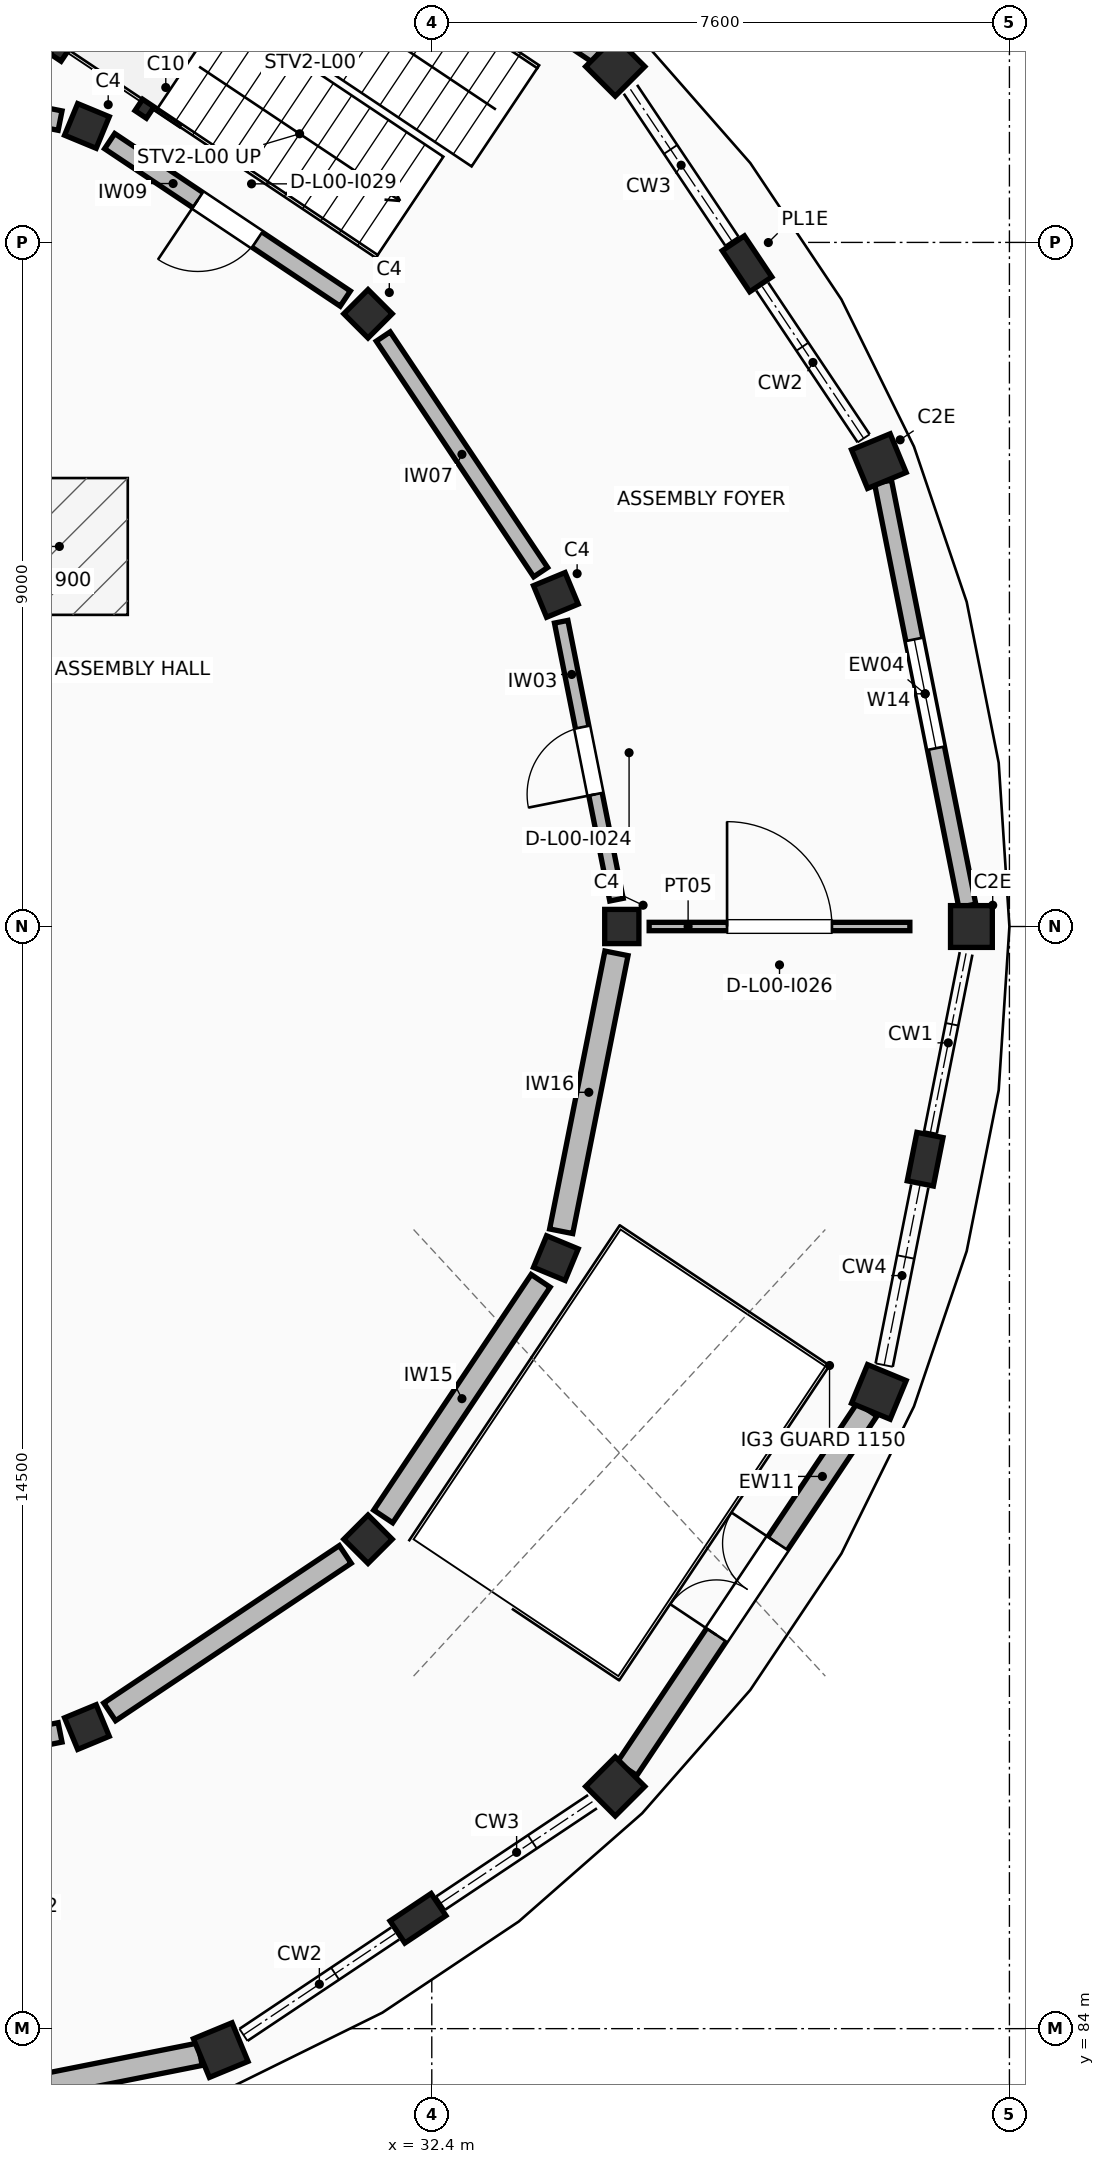
"""IFC4 building model, lengths in metres.
Left out: names, types, materials, properties, quantities, classifications, styles, units other than length and angle.
Written with IfcOpenShell. Run it as: python <this file> out.ifc"""

import sys

from ifc_helpers import new_model, si_unit, direction, frame, frame_2d, origin, origin_2d, place, context, subcontext, project, spatial, rectangle, hollow_rectangle, extrude, element, fill, save


model = new_model("IFC4")
c1 = context("Model", 3, precision=1e-05, world=origin(), true_north=direction((0.0, 1.0)))
c2 = subcontext(c1, "Body", "Model", "MODEL_VIEW")
j1 = project(units=[si_unit("LENGTHUNIT", "METRE"), si_unit("PLANEANGLEUNIT", "RADIAN")], contexts=[c1])
p1 = place(None, origin())
s1 = spatial("IfcSite", under=j1, at=p1, CompositionType="ELEMENT")
p2 = place(p1, origin())
s2 = spatial("IfcBuilding", under=s1, at=p2, CompositionType="ELEMENT")
p3 = place(p2, origin())
s3 = spatial("IfcBuildingStorey", under=s2, at=p3, CompositionType="ELEMENT", Elevation=0.0)
p4 = place(p3, frame((34.9, 98.5, 0.0), z_axis=(0.0, 0.0, 1.0), x_axis=(1.0, 0.0, 0.0)))
e1 = element("IfcColumn", 1, at=p4, inside=s3, PredefinedType="COLUMN", context=c2, shape_type="SweptSolid", body=[
    extrude(rectangle(XDim=0.45, YDim=0.45, at=origin_2d()), origin(), (0.0, 0.0, 1.0), 4.42),
])
p5 = place(p3, frame((39.5, 98.5, 0.0), z_axis=(0.0, 0.0, 1.0), x_axis=(1.0, 0.0, 0.0)))
e2 = element("IfcColumn", 2, at=p5, inside=s3, PredefinedType="COLUMN", context=c2, shape_type="SweptSolid", body=[
    extrude(rectangle(XDim=0.55, YDim=0.55, at=origin_2d()), origin(), (0.0, 0.0, 1.0), 4.42),
])
p6 = place(p3, frame((34.032, 102.863, 0.0), z_axis=(0.0, 0.0, 1.0), x_axis=(0.923879532511, 0.382683432365, 0.0)))
e3 = element("IfcColumn", 3, at=p6, inside=s3, PredefinedType="COLUMN", context=c2, shape_type="SweptSolid", body=[
    extrude(rectangle(XDim=0.45, YDim=0.45, at=origin_2d()), origin(), (0.0, 0.0, 1.0), 4.42),
])
p7 = place(p3, frame((38.282, 104.623, 0.0), z_axis=(0.0, 0.0, 1.0), x_axis=(0.923879532511, 0.382683432365, 0.0)))
e4 = element("IfcColumn", 4, at=p7, inside=s3, PredefinedType="COLUMN", context=c2, shape_type="SweptSolid", body=[
    extrude(rectangle(XDim=0.55, YDim=0.55, at=origin_2d()), origin(), (0.0, 0.0, 1.0), 4.42),
])
p8 = place(p3, frame((31.561, 106.561, 0.0), z_axis=(0.0, 0.0, 1.0), x_axis=(0.707106781187, 0.707106781187, 0.0)))
e5 = element("IfcColumn", 5, at=p8, inside=s3, PredefinedType="COLUMN", context=c2, shape_type="SweptSolid", body=[
    extrude(rectangle(XDim=0.45, YDim=0.45, at=origin_2d()), origin(), (0.0, 0.0, 1.0), 4.42),
])
p9 = place(p3, frame((34.814, 109.814, 0.0), z_axis=(0.0, 0.0, 1.0), x_axis=(0.707106781187, 0.707106781187, 0.0)))
e6 = element("IfcColumn", 6, at=p9, inside=s3, PredefinedType="COLUMN", context=c2, shape_type="SweptSolid", body=[
    extrude(rectangle(XDim=0.55, YDim=0.55, at=origin_2d()), origin(), (0.0, 0.0, 1.0), 4.42),
])
for number, where, z_axis, x_axis in (
    (7, (27.863, 109.032, 0.0), (0.0, 0.0, 1.0), (0.383, 0.924, 0.0)),
    (8, (27.863, 87.968, 0.0), (0.0, 0.0, 1.0), (0.383, -0.924, 0.0)),
):
    element("IfcColumn", number, at=place(p3, frame(where, z_axis=z_axis, x_axis=x_axis)), inside=s3, PredefinedType="COLUMN", context=c2, shape_type="SweptSolid", body=[
        extrude(rectangle(XDim=0.45, YDim=0.45, at=origin_2d()), origin(), (0.0, 0.0, 1.0), 4.42),
    ])
p10 = place(p3, frame((29.623, 83.718, 0.0), z_axis=(0.0, 0.0, 1.0), x_axis=(0.382683432365, -0.923879532511, 0.0)))
e9 = element("IfcColumn", 9, at=p10, inside=s3, PredefinedType="COLUMN", context=c2, shape_type="SweptSolid", body=[
    extrude(rectangle(XDim=0.55, YDim=0.55, at=origin_2d()), origin(), (0.0, 0.0, 1.0), 4.42),
])
p11 = place(p3, frame((31.561, 90.439, 0.0), z_axis=(0.0, 0.0, 1.0), x_axis=(0.707106781187, -0.707106781187, 0.0)))
e10 = element("IfcColumn", 10, at=p11, inside=s3, PredefinedType="COLUMN", context=c2, shape_type="SweptSolid", body=[
    extrude(rectangle(XDim=0.45, YDim=0.45, at=origin_2d()), origin(), (0.0, 0.0, 1.0), 4.42),
])
p12 = place(p3, frame((34.814, 87.186, 0.0), z_axis=(0.0, 0.0, 1.0), x_axis=(0.707106781187, -0.707106781187, 0.0)))
e11 = element("IfcColumn", 11, at=p12, inside=s3, PredefinedType="COLUMN", context=c2, shape_type="SweptSolid", body=[
    extrude(rectangle(XDim=0.55, YDim=0.55, at=origin_2d()), origin(), (0.0, 0.0, 1.0), 4.42),
])
p13 = place(p3, frame((34.032, 94.137, 0.0), z_axis=(0.0, 0.0, 1.0), x_axis=(0.923879532511, -0.382683432365, 0.0)))
e12 = element("IfcColumn", 12, at=p13, inside=s3, PredefinedType="COLUMN", context=c2, shape_type="SweptSolid", body=[
    extrude(rectangle(XDim=0.45, YDim=0.45, at=origin_2d()), origin(), (0.0, 0.0, 1.0), 4.42),
])
p14 = place(p3, frame((38.282, 92.377, 0.0), z_axis=(0.0, 0.0, 1.0), x_axis=(0.923879532511, -0.382683432365, 0.0)))
e13 = element("IfcColumn", 13, at=p14, inside=s3, PredefinedType="COLUMN", context=c2, shape_type="SweptSolid", body=[
    extrude(rectangle(XDim=0.55, YDim=0.55, at=origin_2d()), origin(), (0.0, 0.0, 1.0), 4.42),
])
for number, where, z_axis, x_axis in (
    (14, (36.548, 107.218, 0.0), (0.0, 0.0, 1.0), (0.831, 0.556, 0.0)),
    (15, (32.218, 85.452, 0.0), (0.0, 0.0, 1.0), (0.556, -0.831, 0.0)),
    (16, (38.891, 95.438, 0.0), (0.0, 0.0, 1.0), (0.981, -0.195, 0.0)),
):
    element("IfcColumn", number, at=place(p3, frame(where, z_axis=z_axis, x_axis=x_axis)), inside=s3, PredefinedType="PILASTER", context=c2, shape_type="SweptSolid", body=[
        extrude(rectangle(XDim=0.35, YDim=0.65, at=origin_2d()), origin(), (0.0, 0.0, 1.0), 4.42),
    ])
p15 = place(p3, frame((39.446, 98.773, 0.0), z_axis=(0.0, 0.0, 1.0), x_axis=(-0.195075787902, 0.980788171306, 0.0)))
e17 = element("IfcWall", 17, at=p15, inside=s3, PredefinedType="STANDARD", context=c2, shape_type="SweptSolid", body=[
    extrude(rectangle(XDim=5.687, YDim=0.228, at=frame_2d((2.844, 0.0))), origin(), (0.0, 0.0, 1.0), 3.4),
])
p16 = place(p15, frame((2.113, 0.0, 0.95)))
e18 = element("IfcOpeningElement", 18, at=p16, cuts=e17, PredefinedType="OPENING", context=c2, shape_type="SweptSolid", body=[
    extrude(rectangle(XDim=1.46, YDim=1.3, at=frame_2d((0.73, 0.65))), frame((0.0, 0.124, 0.0), z_axis=(0.0, -1.0, 0.0), x_axis=(1.0, 0.0, 0.0)), (0.0, 0.0, 1.0), 0.248),
])
p17 = place(p3, frame((34.583, 109.968, 0.0), z_axis=(0.0, 0.0, 1.0), x_axis=(-0.831475241541, 0.555561808177, 0.0)))
e19 = element("IfcWall", 19, at=p17, inside=s3, PredefinedType="STANDARD", context=c2, shape_type="SweptSolid", body=[
    extrude(rectangle(XDim=5.687, YDim=0.24, at=frame_2d((2.844, 0.0))), origin(), (0.0, 0.0, 1.0), 3.4),
])
p18 = place(p17, frame((1.918, 0.0, 0.0)))
e20 = element("IfcOpeningElement", 20, at=p18, cuts=e19, PredefinedType="OPENING", context=c2, shape_type="SweptSolid", body=[
    extrude(rectangle(XDim=1.85, YDim=2.28, at=frame_2d((0.925, 1.14))), frame((0.0, 0.13, 0.0), z_axis=(0.0, -1.0, 0.0), x_axis=(1.0, 0.0, 0.0)), (0.0, 0.0, 1.0), 0.26),
])
p19 = place(p3, frame((23.773, 82.554, 0.0), z_axis=(0.0, 0.0, 1.0), x_axis=(0.980788171306, 0.195075787902, 0.0)))
e21 = element("IfcWall", 21, at=p19, inside=s3, PredefinedType="STANDARD", context=c2, shape_type="SweptSolid", body=[
    extrude(rectangle(XDim=5.687, YDim=0.3, at=frame_2d((2.844, 0.0))), origin(), (0.0, 0.0, 1.0), 3.4),
])
p20 = place(p19, frame((2.053, 0.0, 0.95)))
e22 = element("IfcOpeningElement", 22, at=p20, cuts=e21, PredefinedType="OPENING", context=c2, shape_type="SweptSolid", body=[
    extrude(rectangle(XDim=1.58, YDim=1.15, at=frame_2d((0.79, 0.575))), frame((0.0, 0.16, 0.0), z_axis=(0.0, -1.0, 0.0), x_axis=(1.0, 0.0, 0.0)), (0.0, 0.0, 1.0), 0.32),
])
p21 = place(p3, frame((34.968, 87.417, 0.0), z_axis=(0.0, 0.0, 1.0), x_axis=(0.555561808177, 0.831475241541, 0.0)))
e23 = element("IfcWall", 23, at=p21, inside=s3, PredefinedType="STANDARD", context=c2, shape_type="SweptSolid", body=[
    extrude(rectangle(XDim=5.687, YDim=0.312, at=frame_2d((2.844, 0.0))), origin(), (0.0, 0.0, 1.0), 3.4),
])
p22 = place(p21, frame((2.118, 0.0, 0.0)))
e24 = element("IfcOpeningElement", 24, at=p22, cuts=e23, PredefinedType="OPENING", context=c2, shape_type="SweptSolid", body=[
    extrude(rectangle(XDim=1.45, YDim=2.22, at=frame_2d((0.725, 1.11))), frame((0.0, 0.166, 0.0), z_axis=(0.0, -1.0, 0.0), x_axis=(1.0, 0.0, 0.0)), (0.0, 0.0, 1.0), 0.332),
])
for number, where, z_axis, x_axis in (
    (25, (28.62, 109.259, 0.0), (0.0, 0.0, 1.0), (-0.831, 0.556, 0.0)),
    (26, (27.498, 110.009, 0.0), (0.0, 0.0, 1.0), (-0.831, 0.556, 0.0)),
):
    element("IfcColumn", number, at=place(p3, frame(where, z_axis=z_axis, x_axis=x_axis)), inside=s3, PredefinedType="COLUMN", context=c2, shape_type="SweptSolid", body=[
        extrude(hollow_rectangle(XDim=0.18, YDim=0.18, WallThickness=0.01, InnerFilletRadius=0.01, OuterFilletRadius=0.02, at=origin_2d()), origin(), (0.0, 0.0, 1.0), 2.015),
    ])
p23 = place(p3, frame((34.83, 98.853, 0.0), z_axis=(0.0, 0.0, 1.0), x_axis=(-0.195083359546, 0.980786665299, 0.0)))
e27 = element("IfcWall", 27, at=p23, inside=s3, PredefinedType="STANDARD", context=c2, shape_type="SweptSolid", body=[
    extrude(rectangle(XDim=3.728, YDim=0.18, at=frame_2d((1.864, 0.0))), origin(), (0.0, 0.0, 1.0), 3.38),
])
p24 = place(p23, frame((1.414, 0.0, 0.0)))
e28 = element("IfcOpeningElement", 28, at=p24, cuts=e27, PredefinedType="OPENING", context=c2, shape_type="SweptSolid", body=[
    extrude(rectangle(XDim=0.9, YDim=2.06, at=frame_2d((0.45, 1.03))), frame((0.0, 0.1, 0.0), z_axis=(0.0, -1.0, 0.0), x_axis=(1.0, 0.0, 0.0)), (0.0, 0.0, 1.0), 0.2),
])
p25 = place(p3, frame((35.26, 98.5, 0.0), z_axis=(0.0, 0.0, 1.0), x_axis=(1.0, 0.0, 0.0)))
e29 = element("IfcWall", 29, at=p25, inside=s3, PredefinedType="PARTITIONING", context=c2, shape_type="SweptSolid", body=[
    extrude(rectangle(XDim=3.43, YDim=0.11, at=frame_2d((1.715, 0.0))), origin(), (0.0, 0.0, 1.0), 3.38),
])
p26 = place(p25, frame((1.025, 0.0, 0.0)))
e30 = element("IfcOpeningElement", 30, at=p26, cuts=e29, PredefinedType="OPENING", context=c2, shape_type="SweptSolid", body=[
    extrude(rectangle(XDim=1.38, YDim=2.18, at=frame_2d((0.69, 1.09))), frame((0.0, 0.065, 0.0), z_axis=(0.0, -1.0, 0.0), x_axis=(1.0, 0.0, 0.0)), (0.0, 0.0, 1.0), 0.13),
])
p27 = place(p3, frame((33.832, 103.162, 0.0), z_axis=(0.0, 0.0, 1.0), x_axis=(-0.555576382584, 0.831465503262, 0.0)))
e31 = element("IfcWall", 31, at=p27, inside=s3, PredefinedType="STANDARD", context=c2, shape_type="SweptSolid", body=[
    extrude(rectangle(XDim=3.728, YDim=0.22, at=frame_2d((1.864, 0.0))), origin(), (0.0, 0.0, 1.0), 3.38),
])
p28 = place(p3, frame((31.262, 106.761, 0.0), z_axis=(0.0, 0.0, 1.0), x_axis=(-0.831465503262, 0.555576382584, 0.0)))
e32 = element("IfcWall", 32, at=p28, inside=s3, PredefinedType="STANDARD", context=c2, shape_type="SweptSolid", body=[
    extrude(rectangle(XDim=3.728, YDim=0.24, at=frame_2d((1.864, 0.0))), origin(), (0.0, 0.0, 1.0), 3.38),
])
p29 = place(p28, frame((1.394, 0.0, 0.0)))
e33 = element("IfcOpeningElement", 33, at=p29, cuts=e32, PredefinedType="OPENING", context=c2, shape_type="SweptSolid", body=[
    extrude(rectangle(XDim=0.94, YDim=2.12, at=frame_2d((0.47, 1.06))), frame((0.0, 0.13, 0.0), z_axis=(0.0, -1.0, 0.0), x_axis=(1.0, 0.0, 0.0)), (0.0, 0.0, 1.0), 0.26),
])
p30 = place(p3, frame((27.51, 109.103, 0.0), z_axis=(0.0, 0.0, 1.0), x_axis=(-0.980786665299, 0.195083359546, 0.0)))
e34 = element("IfcWall", 34, at=p30, inside=s3, PredefinedType="STANDARD", context=c2, shape_type="SweptSolid", body=[
    extrude(rectangle(XDim=3.728, YDim=0.26, at=frame_2d((1.864, 0.0))), origin(), (0.0, 0.0, 1.0), 3.38),
])
p31 = place(p3, frame((23.853, 87.17, 0.0), z_axis=(0.0, 0.0, 1.0), x_axis=(0.980786665299, 0.195083359546, 0.0)))
e35 = element("IfcWall", 35, at=p31, inside=s3, PredefinedType="STANDARD", context=c2, shape_type="SweptSolid", body=[
    extrude(rectangle(XDim=3.728, YDim=0.26, at=frame_2d((1.864, 0.0))), origin(), (0.0, 0.0, 1.0), 3.38),
])
p32 = place(p31, frame((1.434, 0.0, 0.0)))
e36 = element("IfcOpeningElement", 36, at=p32, cuts=e35, PredefinedType="OPENING", context=c2, shape_type="SweptSolid", body=[
    extrude(rectangle(XDim=0.86, YDim=2.12, at=frame_2d((0.43, 1.06))), frame((0.0, 0.14, 0.0), z_axis=(0.0, -1.0, 0.0), x_axis=(1.0, 0.0, 0.0)), (0.0, 0.0, 1.0), 0.28),
])
p33 = place(p3, frame((28.162, 88.168, 0.0), z_axis=(0.0, 0.0, 1.0), x_axis=(0.831465503262, 0.555576382584, 0.0)))
e37 = element("IfcWall", 37, at=p33, inside=s3, PredefinedType="STANDARD", context=c2, shape_type="SweptSolid", body=[
    extrude(rectangle(XDim=3.728, YDim=0.28, at=frame_2d((1.864, 0.0))), origin(), (0.0, 0.0, 1.0), 3.38),
])
p34 = place(p3, frame((31.761, 90.738, 0.0), z_axis=(0.0, 0.0, 1.0), x_axis=(0.555576382584, 0.831465503262, 0.0)))
e38 = element("IfcWall", 38, at=p34, inside=s3, PredefinedType="STANDARD", context=c2, shape_type="SweptSolid", body=[
    extrude(rectangle(XDim=3.728, YDim=0.3, at=frame_2d((1.864, 0.0))), origin(), (0.0, 0.0, 1.0), 3.38),
])
p35 = place(p3, frame((34.103, 94.49, 0.0), z_axis=(0.0, 0.0, 1.0), x_axis=(0.195083359546, 0.980786665299, 0.0)))
e39 = element("IfcWall", 39, at=p35, inside=s3, PredefinedType="STANDARD", context=c2, shape_type="SweptSolid", body=[
    extrude(rectangle(XDim=3.728, YDim=0.31, at=frame_2d((1.864, 0.0))), origin(), (0.0, 0.0, 1.0), 3.38),
])
p36 = place(p16, origin())
e40 = element("IfcWindow", 40, at=p36, inside=s3, PartitioningType="SINGLE_PANEL", PredefinedType="WINDOW", context=c2, shape_type="SweptSolid", body=[
    extrude(rectangle(XDim=1.46, YDim=1.3, at=frame_2d((0.73, 0.65))), frame((0.0, 0.03, 0.0), z_axis=(0.0, -1.0, 0.0), x_axis=(1.0, 0.0, 0.0)), (0.0, 0.0, 1.0), 0.06),
])
fill(e18, e40)
p37 = place(p22, frame((1.45, 0.0, 0.0), z_axis=(0.0, 0.0, 1.0), x_axis=(-1.0, 0.0, 0.0)))
e41 = element("IfcDoor", 41, at=p37, inside=s3, OperationType="DOUBLE_DOOR_SINGLE_SWING", PredefinedType="DOOR", context=c2, shape_type="SweptSolid", body=[
    extrude(rectangle(XDim=1.45, YDim=2.22, at=frame_2d((0.725, 1.11))), frame((0.0, 0.025, 0.0), z_axis=(0.0, -1.0, 0.0), x_axis=(1.0, 0.0, 0.0)), (0.0, 0.0, 1.0), 0.05),
])
fill(e24, e41)
p38 = place(p24, frame((0.9, 0.0, 0.0), z_axis=(0.0, 0.0, 1.0), x_axis=(-1.0, 0.0, 0.0)))
e42 = element("IfcDoor", 42, at=p38, inside=s3, OperationType="SINGLE_SWING_LEFT", PredefinedType="DOOR", context=c2, shape_type="SweptSolid", body=[
    extrude(rectangle(XDim=0.9, YDim=2.06, at=frame_2d((0.45, 1.03))), frame((0.0, 0.025, 0.0), z_axis=(0.0, -1.0, 0.0), x_axis=(1.0, 0.0, 0.0)), (0.0, 0.0, 1.0), 0.05),
])
fill(e28, e42)
p39 = place(p26, origin())
e43 = element("IfcDoor", 43, at=p39, inside=s3, OperationType="SINGLE_SWING_LEFT", PredefinedType="DOOR", context=c2, shape_type="SweptSolid", body=[
    extrude(rectangle(XDim=1.38, YDim=2.18, at=frame_2d((0.69, 1.09))), frame((0.0, 0.025, 0.0), z_axis=(0.0, -1.0, 0.0), x_axis=(1.0, 0.0, 0.0)), (0.0, 0.0, 1.0), 0.05),
])
fill(e30, e43)
p40 = place(p29, frame((0.94, 0.0, 0.0), z_axis=(0.0, 0.0, 1.0), x_axis=(-1.0, 0.0, 0.0)))
e44 = element("IfcDoor", 44, at=p40, inside=s3, OperationType="SINGLE_SWING_RIGHT", PredefinedType="DOOR", context=c2, shape_type="SweptSolid", body=[
    extrude(rectangle(XDim=0.94, YDim=2.12, at=frame_2d((0.47, 1.06))), frame((0.0, 0.025, 0.0), z_axis=(0.0, -1.0, 0.0), x_axis=(1.0, 0.0, 0.0)), (0.0, 0.0, 1.0), 0.05),
])
fill(e33, e44)
save(model, sys.argv[1])
